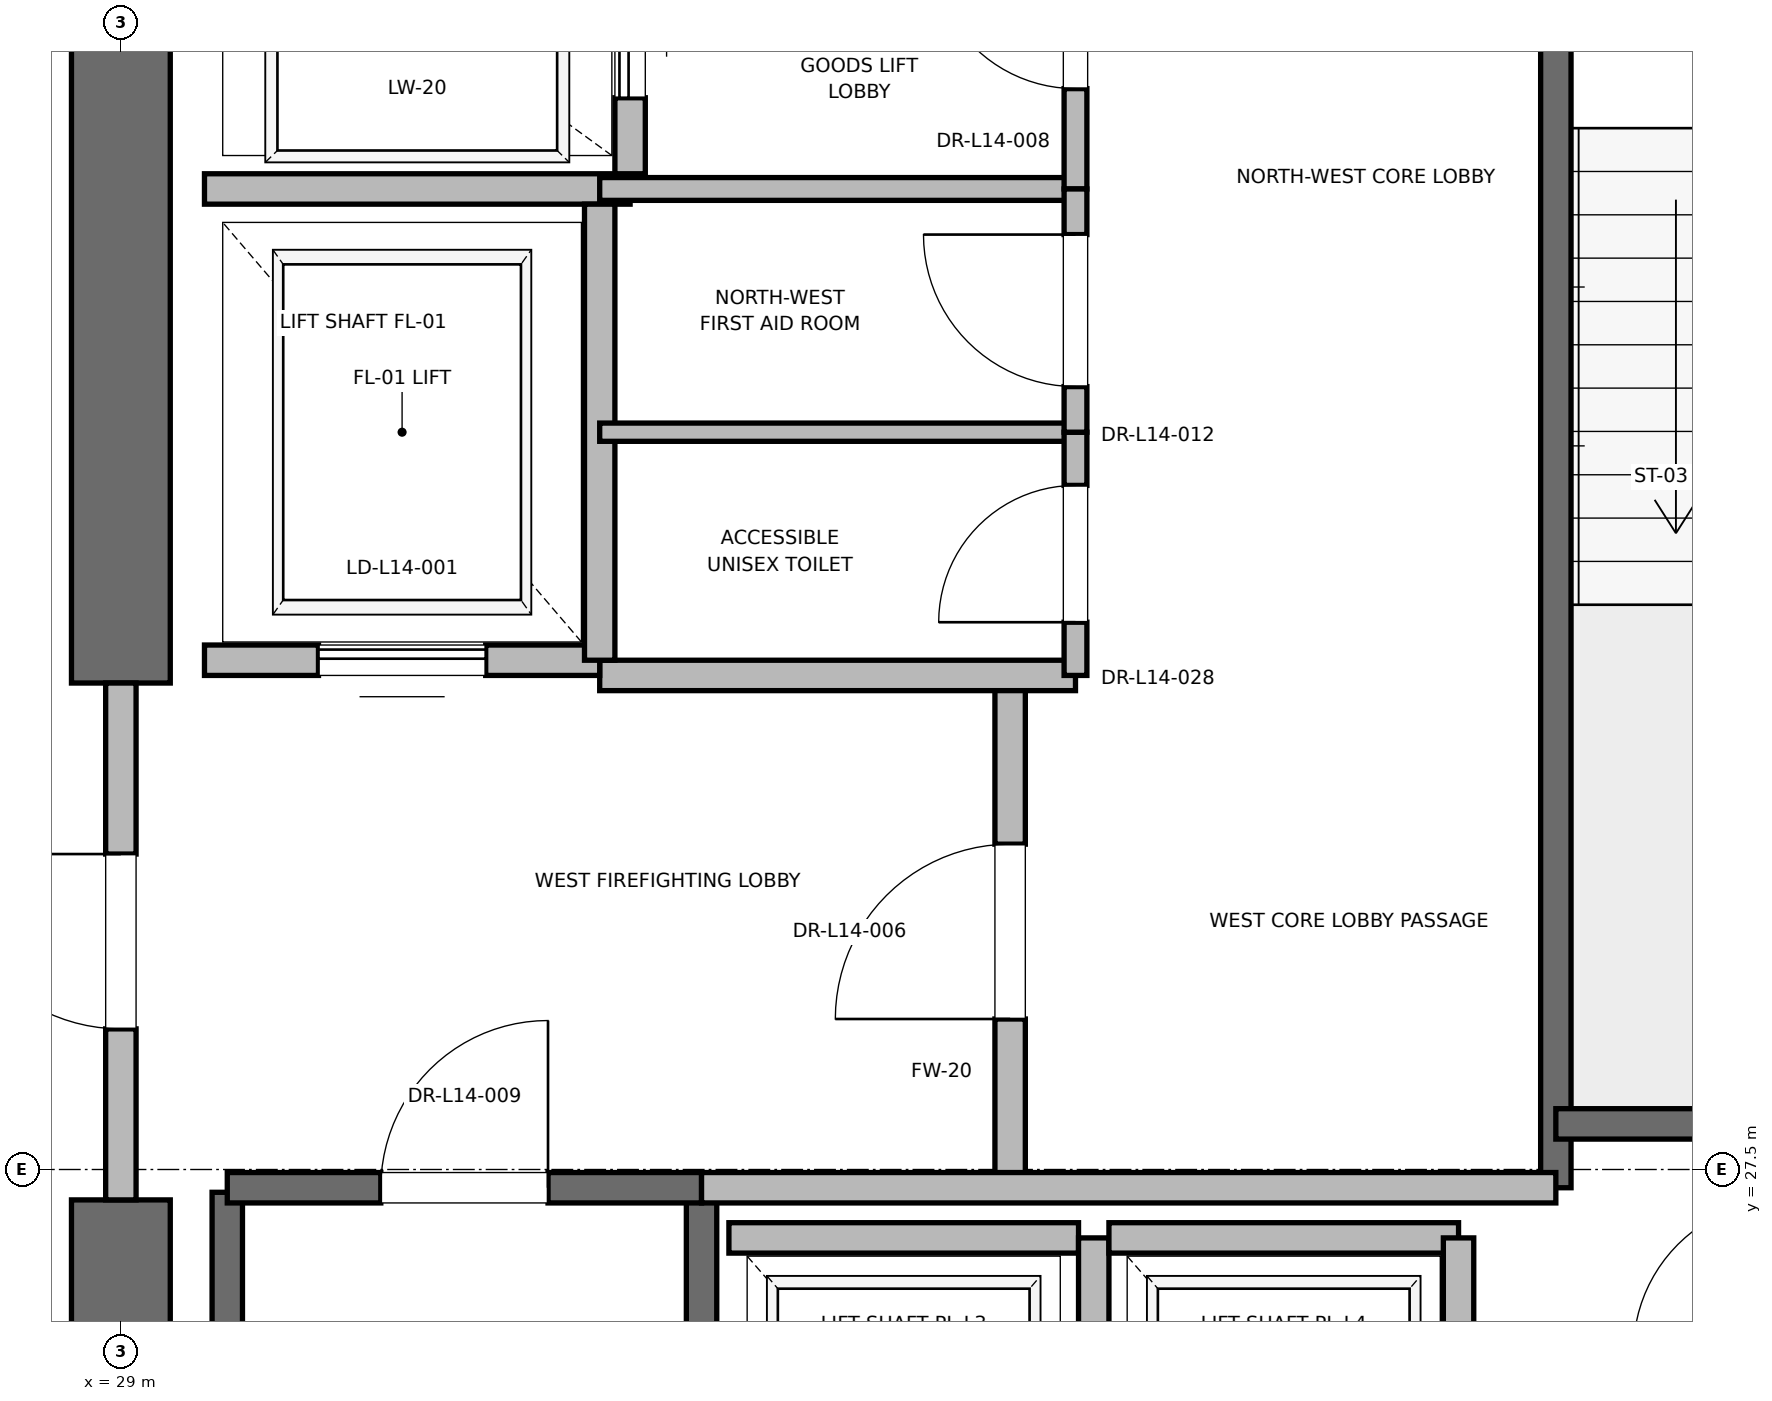
"""IFC4 building model, lengths in metres.
Left out: names, types, materials, properties, quantities, classifications, styles, units other than length and angle.
Written with IfcOpenShell. Run it as: python <this file> out.ifc"""

import sys

from ifc_helpers import new_model, si_unit, direction, frame, frame_2d, origin, place, context, subcontext, project, spatial, rectangle, extrude, element, fill, save


model = new_model("IFC4")
c1 = context("Model", 3, precision=1e-05, world=origin(), true_north=direction((0.0, 1.0)))
c2 = subcontext(c1, "Body", "Model", "MODEL_VIEW")
j1 = project(units=[si_unit("LENGTHUNIT", "METRE"), si_unit("PLANEANGLEUNIT", "RADIAN")], contexts=[c1])
p1 = place(None, origin())
s1 = spatial("IfcSite", under=j1, at=p1, CompositionType="ELEMENT")
p2 = place(p1, origin())
s2 = spatial("IfcBuilding", under=s1, at=p2, CompositionType="ELEMENT")
p3 = place(p2, frame((0.0, 0.0, 63.6)))
s3 = spatial("IfcBuildingStorey", under=s2, at=p3, CompositionType="ELEMENT", Elevation=63.6)
p4 = place(p3, frame((29.0, 18.5, 0.0), z_axis=(0.0, 0.0, 1.0), x_axis=(0.0, 1.0, 0.0)))
e1 = element("IfcWall", 1, at=p4, inside=s3, PredefinedType="SHEAR", context=c2, shape_type="SweptSolid", body=[
    extrude(rectangle(XDim=8.8, YDim=0.65, at=frame_2d((4.4, 0.0))), origin(), (0.0, 0.0, 1.0), 3.76),
])
p5 = place(p3, frame((29.0, 30.7, 0.0), z_axis=(0.0, 0.0, 1.0), x_axis=(0.0, 1.0, 0.0)))
e2 = element("IfcWall", 2, at=p5, inside=s3, PredefinedType="SHEAR", context=c2, shape_type="SweptSolid", body=[
    extrude(rectangle(XDim=5.8, YDim=0.65, at=frame_2d((2.9, 0.0))), origin(), (0.0, 0.0, 1.0), 3.76),
])
p6 = place(p3, frame((29.7, 19.2, 0.0), z_axis=(0.0, 0.0, 1.0), x_axis=(0.0, 1.0, 0.0)))
e3 = element("IfcWall", 3, at=p6, inside=s3, PredefinedType="SOLIDWALL", context=c2, shape_type="SweptSolid", body=[
    extrude(rectangle(XDim=8.15, YDim=0.2, at=frame_2d((4.075, 0.0))), origin(), (0.0, 0.0, 1.0), 3.76),
])
p7 = place(p3, frame((32.82, 18.6, 0.0), z_axis=(0.0, 0.0, 1.0), x_axis=(0.0, 1.0, 0.0)))
e4 = element("IfcWall", 4, at=p7, inside=s3, PredefinedType="SOLIDWALL", context=c2, shape_type="SweptSolid", body=[
    extrude(rectangle(XDim=8.78, YDim=0.2, at=frame_2d((4.39, 0.0))), origin(), (0.0, 0.0, 1.0), 3.76),
])
p8 = place(p3, frame((29.7, 27.38, 0.0), z_axis=(0.0, 0.0, 1.0), x_axis=(1.0, 0.0, 0.0)))
e5 = element("IfcWall", 5, at=p8, inside=s3, PredefinedType="SOLIDWALL", context=c2, shape_type="SweptSolid", body=[
    extrude(rectangle(XDim=3.12, YDim=0.2, at=frame_2d((1.56, 0.0))), origin(), (0.0, 0.0, 1.0), 3.76),
])
p9 = place(p8, frame((1.01, 0.0, 0.0)))
e6 = element("IfcOpeningElement", 6, at=p9, cuts=e5, PredefinedType="OPENING", context=c2, shape_type="SweptSolid", body=[
    extrude(rectangle(XDim=1.1, YDim=2.15, at=frame_2d((0.55, 1.075))), frame((0.0, 0.1, 0.0), z_axis=(0.0, -1.0, 0.0), x_axis=(1.0, 0.0, 0.0)), (0.0, 0.0, 1.0), 0.2),
])
p10 = place(p3, frame((38.44, 27.38, 0.0), z_axis=(0.0, 0.0, 1.0), x_axis=(0.0, 1.0, 0.0)))
e7 = element("IfcWall", 7, at=p10, inside=s3, PredefinedType="SOLIDWALL", context=c2, shape_type="SweptSolid", body=[
    extrude(rectangle(XDim=8.87, YDim=0.2, at=frame_2d((4.435, 0.0))), origin(), (0.0, 0.0, 1.0), 3.76),
])
p11 = place(p3, frame((38.44, 27.8, 0.0), z_axis=(0.0, 0.0, 1.0), x_axis=(1.0, 0.0, 0.0)))
e8 = element("IfcWall", 8, at=p11, inside=s3, PredefinedType="SOLIDWALL", context=c2, shape_type="SweptSolid", body=[
    extrude(rectangle(XDim=3.32, YDim=0.2, at=frame_2d((1.66, 0.0))), origin(), (0.0, 0.0, 1.0), 3.76),
])
p12 = place(p3, frame((34.85, 27.38, 0.0), z_axis=(0.0, 0.0, 1.0), x_axis=(0.0, 1.0, 0.0)))
e9 = element("IfcWall", 9, at=p12, inside=s3, PredefinedType="PARTITIONING", context=c2, shape_type="SweptSolid", body=[
    extrude(rectangle(XDim=3.37, YDim=0.2, at=frame_2d((1.685, 0.0))), origin(), (0.0, 0.0, 1.0), 3.76),
])
p13 = place(p12, frame((1.11, 0.0, 0.0)))
e10 = element("IfcOpeningElement", 10, at=p13, cuts=e9, PredefinedType="OPENING", context=c2, shape_type="SweptSolid", body=[
    extrude(rectangle(XDim=1.15, YDim=2.2, at=frame_2d((0.575, 1.1))), frame((0.0, 0.1, 0.0), z_axis=(0.0, -1.0, 0.0), x_axis=(1.0, 0.0, 0.0)), (0.0, 0.0, 1.0), 0.2),
])
p14 = place(p3, frame((29.0, 27.3, 0.0), z_axis=(0.0, 0.0, 1.0), x_axis=(0.0, 1.0, 0.0)))
e11 = element("IfcWall", 11, at=p14, inside=s3, PredefinedType="PARTITIONING", context=c2, shape_type="SweptSolid", body=[
    extrude(rectangle(XDim=3.4, YDim=0.2, at=frame_2d((1.7, 0.0))), origin(), (0.0, 0.0, 1.0), 2.54),
])
p15 = place(p14, frame((1.125, 0.0, 0.0)))
e12 = element("IfcOpeningElement", 12, at=p15, cuts=e11, PredefinedType="OPENING", context=c2, shape_type="SweptSolid", body=[
    extrude(rectangle(XDim=1.15, YDim=2.2, at=frame_2d((0.575, 1.1))), frame((0.0, 0.1, 0.0), z_axis=(0.0, -1.0, 0.0), x_axis=(1.0, 0.0, 0.0)), (0.0, 0.0, 1.0), 0.2),
])
p16 = place(p3, frame((32.82, 27.38, 0.0), z_axis=(0.0, 0.0, 1.0), x_axis=(1.0, 0.0, 0.0)))
e13 = element("IfcWall", 13, at=p16, inside=s3, PredefinedType="PARTITIONING", context=c2, shape_type="SweptSolid", body=[
    extrude(rectangle(XDim=5.62, YDim=0.2, at=frame_2d((2.81, 0.0))), origin(), (0.0, 0.0, 1.0), 3.76),
])
p17 = place(p3, frame((32.15, 30.75, 0.0), z_axis=(0.0, 0.0, 1.0), x_axis=(1.0, 0.0, 0.0)))
e14 = element("IfcWall", 14, at=p17, inside=s3, PredefinedType="PARTITIONING", context=c2, shape_type="SweptSolid", body=[
    extrude(rectangle(XDim=3.13, YDim=0.2, at=frame_2d((1.565, 0.0))), origin(), (0.0, 0.0, 1.0), 3.76),
])
p18 = place(p3, frame((29.55, 30.85, 0.0), z_axis=(0.0, 0.0, 1.0), x_axis=(1.0, 0.0, 0.0)))
e15 = element("IfcWall", 15, at=p18, inside=s3, PredefinedType="SOLIDWALL", context=c2, shape_type="SweptSolid", body=[
    extrude(rectangle(XDim=2.6, YDim=0.2, at=frame_2d((1.3, 0.0))), origin(), (0.0, 0.0, 1.0), 2.54),
])
p19 = place(p18, frame((0.75, 0.0, 0.0)))
e16 = element("IfcOpeningElement", 16, at=p19, cuts=e15, PredefinedType="OPENING", context=c2, shape_type="SweptSolid", body=[
    extrude(rectangle(XDim=1.1, YDim=2.2, at=frame_2d((0.55, 1.1))), frame((0.0, 0.1, 0.0), z_axis=(0.0, -1.0, 0.0), x_axis=(1.0, 0.0, 0.0)), (0.0, 0.0, 1.0), 0.2),
])
p20 = place(p3, frame((29.55, 33.95, 0.0), z_axis=(0.0, 0.0, 1.0), x_axis=(1.0, 0.0, 0.0)))
e17 = element("IfcWall", 17, at=p20, inside=s3, PredefinedType="SOLIDWALL", context=c2, shape_type="SweptSolid", body=[
    extrude(rectangle(XDim=2.8, YDim=0.2, at=frame_2d((1.4, 0.0))), origin(), (0.0, 0.0, 1.0), 3.76),
])
p21 = place(p3, frame((32.15, 30.85, 0.0), z_axis=(0.0, 0.0, 1.0), x_axis=(0.0, 1.0, 0.0)))
e18 = element("IfcWall", 18, at=p21, inside=s3, PredefinedType="SOLIDWALL", context=c2, shape_type="SweptSolid", body=[
    extrude(rectangle(XDim=3.0, YDim=0.2, at=frame_2d((1.5, 0.0))), origin(), (0.0, 0.0, 1.0), 3.76),
])
p22 = place(p3, frame((32.35, 34.05, 0.0), z_axis=(0.0, 0.0, 1.0), x_axis=(0.0, 1.0, 0.0)))
e19 = element("IfcWall", 19, at=p22, inside=s3, PredefinedType="SOLIDWALL", context=c2, shape_type="SweptSolid", body=[
    extrude(rectangle(XDim=2.1, YDim=0.2, at=frame_2d((1.05, 0.0))), origin(), (0.0, 0.0, 1.0), 3.76),
])
p23 = place(p22, frame((0.5, 0.0, 0.0)))
e20 = element("IfcOpeningElement", 20, at=p23, cuts=e19, PredefinedType="OPENING", context=c2, shape_type="SweptSolid", body=[
    extrude(rectangle(XDim=1.1, YDim=2.2, at=frame_2d((0.55, 1.1))), frame((0.0, 0.1, 0.0), z_axis=(0.0, -1.0, 0.0), x_axis=(1.0, 0.0, 0.0)), (0.0, 0.0, 1.0), 0.2),
])
p24 = place(p3, frame((35.3, 27.05, 0.0), z_axis=(0.0, 0.0, 1.0), x_axis=(-1.0, 0.0, 0.0)))
e21 = element("IfcWall", 21, at=p24, inside=s3, PredefinedType="SOLIDWALL", context=c2, shape_type="SweptSolid", body=[
    extrude(rectangle(XDim=2.3, YDim=0.2, at=frame_2d((1.15, 0.0))), origin(), (0.0, 0.0, 1.0), 3.76),
])
p25 = place(p3, frame((35.4, 24.45, 0.0), z_axis=(0.0, 0.0, 1.0), x_axis=(0.0, 1.0, 0.0)))
e22 = element("IfcWall", 22, at=p25, inside=s3, PredefinedType="SOLIDWALL", context=c2, shape_type="SweptSolid", body=[
    extrude(rectangle(XDim=2.6, YDim=0.2, at=frame_2d((1.3, 0.0))), origin(), (0.0, 0.0, 1.0), 3.76),
])
p26 = place(p3, frame((37.8, 27.05, 0.0), z_axis=(0.0, 0.0, 1.0), x_axis=(-1.0, 0.0, 0.0)))
e23 = element("IfcWall", 23, at=p26, inside=s3, PredefinedType="SOLIDWALL", context=c2, shape_type="SweptSolid", body=[
    extrude(rectangle(XDim=2.3, YDim=0.2, at=frame_2d((1.15, 0.0))), origin(), (0.0, 0.0, 1.0), 3.76),
])
p27 = place(p3, frame((37.8, 24.45, 0.0), z_axis=(0.0, 0.0, 1.0), x_axis=(0.0, 1.0, 0.0)))
e24 = element("IfcWall", 24, at=p27, inside=s3, PredefinedType="SOLIDWALL", context=c2, shape_type="SweptSolid", body=[
    extrude(rectangle(XDim=2.6, YDim=0.2, at=frame_2d((1.3, 0.0))), origin(), (0.0, 0.0, 1.0), 3.76),
])
p28 = place(p3, frame((32.15, 33.95, 0.0), z_axis=(0.0, 0.0, 1.0), x_axis=(1.0, 0.0, 0.0)))
e25 = element("IfcWall", 25, at=p28, inside=s3, PredefinedType="PARTITIONING", context=c2, shape_type="SweptSolid", body=[
    extrude(rectangle(XDim=3.13, YDim=0.15, at=frame_2d((1.565, 0.0))), origin(), (0.0, 0.0, 1.0), 2.85),
])
p29 = place(p3, frame((35.28, 33.95, 0.0), z_axis=(0.0, 0.0, 1.0), x_axis=(0.0, 1.0, 0.0)))
e26 = element("IfcWall", 26, at=p29, inside=s3, PredefinedType="PARTITIONING", context=c2, shape_type="SweptSolid", body=[
    extrude(rectangle(XDim=2.27, YDim=0.15, at=frame_2d((1.135, 0.0))), origin(), (0.0, 0.0, 1.0), 2.54),
])
p30 = place(p29, frame((0.66, 0.0, 0.0)))
e27 = element("IfcOpeningElement", 27, at=p30, cuts=e26, PredefinedType="OPENING", context=c2, shape_type="SweptSolid", body=[
    extrude(rectangle(XDim=0.95, YDim=2.15, at=frame_2d((0.475, 1.075))), frame((0.0, 0.075, 0.0), z_axis=(0.0, -1.0, 0.0), x_axis=(1.0, 0.0, 0.0)), (0.0, 0.0, 1.0), 0.15),
])
p31 = place(p3, frame((32.15, 32.35, 0.0), z_axis=(0.0, 0.0, 1.0), x_axis=(1.0, 0.0, 0.0)))
e28 = element("IfcWall", 28, at=p31, inside=s3, PredefinedType="PARTITIONING", context=c2, shape_type="SweptSolid", body=[
    extrude(rectangle(XDim=3.13, YDim=0.12, at=frame_2d((1.565, 0.0))), origin(), (0.0, 0.0, 1.0), 2.85),
])
p32 = place(p3, frame((35.28, 30.75, 0.0), z_axis=(0.0, 0.0, 1.0), x_axis=(0.0, 1.0, 0.0)))
e29 = element("IfcWall", 29, at=p32, inside=s3, PredefinedType="PARTITIONING", context=c2, shape_type="SweptSolid", body=[
    extrude(rectangle(XDim=1.6, YDim=0.15, at=frame_2d((0.8, 0.0))), origin(), (0.0, 0.0, 1.0), 2.85),
])
p33 = place(p32, frame((0.35, 0.0, 0.0)))
e30 = element("IfcOpeningElement", 30, at=p33, cuts=e29, PredefinedType="OPENING", context=c2, shape_type="SweptSolid", body=[
    extrude(rectangle(XDim=0.9, YDim=2.1, at=frame_2d((0.45, 1.05))), frame((0.0, 0.075, 0.0), z_axis=(0.0, -1.0, 0.0), x_axis=(1.0, 0.0, 0.0)), (0.0, 0.0, 1.0), 0.15),
])
p34 = place(p3, frame((35.28, 32.35, 0.0), z_axis=(0.0, 0.0, 1.0), x_axis=(0.0, 1.0, 0.0)))
e31 = element("IfcWall", 31, at=p34, inside=s3, PredefinedType="PARTITIONING", context=c2, shape_type="SweptSolid", body=[
    extrude(rectangle(XDim=1.6, YDim=0.15, at=frame_2d((0.8, 0.0))), origin(), (0.0, 0.0, 1.0), 2.85),
])
p35 = place(p34, frame((0.3, 0.0, 0.0)))
e32 = element("IfcOpeningElement", 32, at=p35, cuts=e31, PredefinedType="OPENING", context=c2, shape_type="SweptSolid", body=[
    extrude(rectangle(XDim=1.0, YDim=2.15, at=frame_2d((0.5, 1.075))), frame((0.0, 0.075, 0.0), z_axis=(0.0, -1.0, 0.0), x_axis=(1.0, 0.0, 0.0)), (0.0, 0.0, 1.0), 0.15),
])
p36 = place(p9, origin())
e33 = element("IfcDoor", 33, at=p36, inside=s3, OperationType="SINGLE_SWING_RIGHT", PredefinedType="DOOR", context=c2, shape_type="SweptSolid", body=[
    extrude(rectangle(XDim=1.1, YDim=2.15, at=frame_2d((0.55, 1.075))), frame((0.0, 0.025, 0.0), z_axis=(0.0, -1.0, 0.0), x_axis=(1.0, 0.0, 0.0)), (0.0, 0.0, 1.0), 0.05),
])
fill(e6, e33)
p37 = place(p13, origin())
e34 = element("IfcDoor", 34, at=p37, inside=s3, OperationType="SINGLE_SWING_LEFT", PredefinedType="DOOR", context=c2, shape_type="SweptSolid", body=[
    extrude(rectangle(XDim=1.15, YDim=2.2, at=frame_2d((0.575, 1.1))), frame((0.0, 0.025, 0.0), z_axis=(0.0, -1.0, 0.0), x_axis=(1.0, 0.0, 0.0)), (0.0, 0.0, 1.0), 0.05),
])
fill(e10, e34)
p38 = place(p15, origin())
e35 = element("IfcDoor", 35, at=p38, inside=s3, OperationType="SINGLE_SWING_RIGHT", PredefinedType="DOOR", context=c2, shape_type="SweptSolid", body=[
    extrude(rectangle(XDim=1.15, YDim=2.2, at=frame_2d((0.575, 1.1))), frame((0.0, 0.025, 0.0), z_axis=(0.0, -1.0, 0.0), x_axis=(1.0, 0.0, 0.0)), (0.0, 0.0, 1.0), 0.05),
])
fill(e12, e35)
p39 = place(p19, origin())
e36 = element("IfcDoor", 36, at=p39, inside=s3, OperationType="SLIDING_TO_RIGHT", PredefinedType="DOOR", context=c2, shape_type="SweptSolid", body=[
    extrude(rectangle(XDim=1.1, YDim=2.2, at=frame_2d((0.55, 1.1))), frame((0.0, 0.025, 0.0), z_axis=(0.0, -1.0, 0.0), x_axis=(1.0, 0.0, 0.0)), (0.0, 0.0, 1.0), 0.05),
])
fill(e16, e36)
p40 = place(p23, origin())
e37 = element("IfcDoor", 37, at=p40, inside=s3, OperationType="SLIDING_TO_RIGHT", PredefinedType="DOOR", context=c2, shape_type="SweptSolid", body=[
    extrude(rectangle(XDim=1.1, YDim=2.2, at=frame_2d((0.55, 1.1))), frame((0.0, 0.025, 0.0), z_axis=(0.0, -1.0, 0.0), x_axis=(1.0, 0.0, 0.0)), (0.0, 0.0, 1.0), 0.05),
])
fill(e20, e37)
p41 = place(p30, origin())
e38 = element("IfcDoor", 38, at=p41, inside=s3, OperationType="SINGLE_SWING_RIGHT", PredefinedType="DOOR", context=c2, shape_type="SweptSolid", body=[
    extrude(rectangle(XDim=0.95, YDim=2.15, at=frame_2d((0.475, 1.075))), frame((0.0, 0.025, 0.0), z_axis=(0.0, -1.0, 0.0), x_axis=(1.0, 0.0, 0.0)), (0.0, 0.0, 1.0), 0.05),
])
fill(e27, e38)
p42 = place(p33, origin())
e39 = element("IfcDoor", 39, at=p42, inside=s3, OperationType="SINGLE_SWING_LEFT", PredefinedType="DOOR", context=c2, shape_type="SweptSolid", body=[
    extrude(rectangle(XDim=0.9, YDim=2.1, at=frame_2d((0.45, 1.05))), frame((0.0, 0.025, 0.0), z_axis=(0.0, -1.0, 0.0), x_axis=(1.0, 0.0, 0.0)), (0.0, 0.0, 1.0), 0.05),
])
fill(e30, e39)
p43 = place(p35, origin())
e40 = element("IfcDoor", 40, at=p43, inside=s3, OperationType="SINGLE_SWING_RIGHT", PredefinedType="DOOR", context=c2, shape_type="SweptSolid", body=[
    extrude(rectangle(XDim=1.0, YDim=2.15, at=frame_2d((0.5, 1.075))), frame((0.0, 0.025, 0.0), z_axis=(0.0, -1.0, 0.0), x_axis=(1.0, 0.0, 0.0)), (0.0, 0.0, 1.0), 0.05),
])
fill(e32, e40)
save(model, sys.argv[1])
